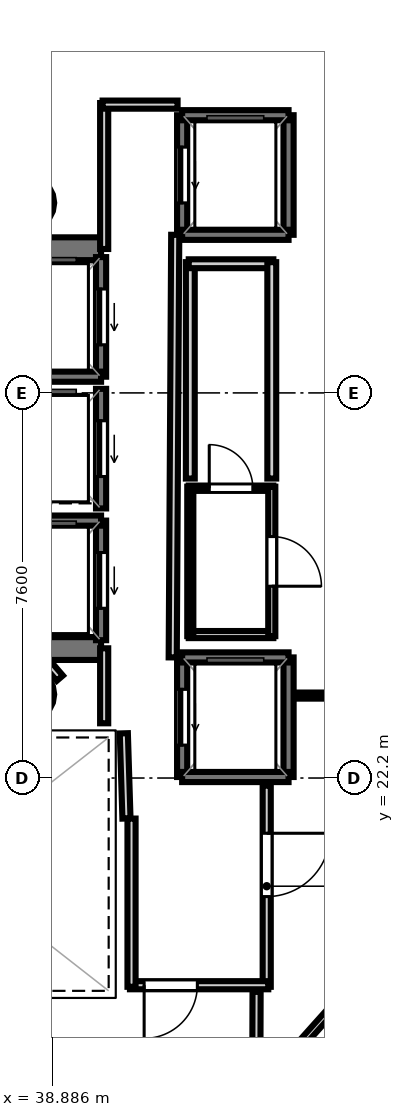
"""IFC4 building model, lengths in metres.
Left out: names, types, materials, properties, quantities, classifications, styles, units other than length and angle.
Written with IfcOpenShell. Run it as: python <this file> out.ifc"""

import sys

from ifc_helpers import new_model, si_unit, direction, frame, frame_2d, origin, origin_2d, place, context, subcontext, project, spatial, rectangle, hollow_circle, extrude, element, fill, save


model = new_model("IFC4")
c1 = context("Model", 3, precision=1e-05, world=origin(), true_north=direction((0.0, 1.0)))
c2 = subcontext(c1, "Body", "Model", "MODEL_VIEW")
j1 = project(units=[si_unit("LENGTHUNIT", "METRE"), si_unit("PLANEANGLEUNIT", "RADIAN")], contexts=[c1])
p1 = place(None, origin())
s1 = spatial("IfcSite", under=j1, at=p1, CompositionType="ELEMENT")
p2 = place(p1, origin())
s2 = spatial("IfcBuilding", under=s1, at=p2, CompositionType="ELEMENT")
p3 = place(p2, frame((0.0, 0.0, 250.1)))
s3 = spatial("IfcBuildingStorey", under=s2, at=p3, CompositionType="ELEMENT", Elevation=250.1)
p4 = place(p3, frame((29.33, 32.645, 0.0), z_axis=(0.0, 0.0, 1.0), x_axis=(1.0, 0.0, 0.0)))
e1 = element("IfcWall", 1, at=p4, inside=s3, PredefinedType="SHEAR", context=c2, shape_type="SweptSolid", body=[
    extrude(rectangle(XDim=10.52, YDim=0.45, at=frame_2d((5.26, 0.0))), origin(), (0.0, 0.0, 1.0), 3.52),
])
p5 = place(p4, frame((0.895, 0.0, 0.0)))
e2 = element("IfcOpeningElement", 2, at=p5, cuts=e1, PredefinedType="OPENING", context=c2, shape_type="SweptSolid", body=[
    extrude(rectangle(XDim=1.25, YDim=2.15, at=frame_2d((0.625, 1.075))), frame((0.0, 0.235, 0.0), z_axis=(0.0, -1.0, 0.0), x_axis=(1.0, 0.0, 0.0)), (0.0, 0.0, 1.0), 0.47),
])
p6 = place(p3, frame((29.33, 24.755, 0.0), z_axis=(0.0, 0.0, 1.0), x_axis=(1.0, 0.0, 0.0)))
e3 = element("IfcWall", 3, at=p6, inside=s3, PredefinedType="SHEAR", context=c2, shape_type="SweptSolid", body=[
    extrude(rectangle(XDim=10.52, YDim=0.45, at=frame_2d((5.26, 0.0))), origin(), (0.0, 0.0, 1.0), 3.52),
])
p7 = place(p6, frame((0.695, 0.0, 0.0)))
e4 = element("IfcOpeningElement", 4, at=p7, cuts=e3, PredefinedType="OPENING", context=c2, shape_type="SweptSolid", body=[
    extrude(rectangle(XDim=1.25, YDim=2.15, at=frame_2d((0.625, 1.075))), frame((0.0, 0.235, 0.0), z_axis=(0.0, -1.0, 0.0), x_axis=(1.0, 0.0, 0.0)), (0.0, 0.0, 1.0), 0.47),
])
for number, where, z_axis, x_axis in (
    (5, (38.4, 33.55, 0.0), (0.0, 0.0, 1.0), (1.0, 0.0, 0.0)),
    (6, (38.4, 23.85, 0.0), (0.0, 0.0, 1.0), (1.0, 0.0, 0.0)),
):
    element("IfcColumn", number, at=place(p3, frame(where, z_axis=z_axis, x_axis=x_axis)), inside=s3, PredefinedType="COLUMN", context=c2, shape_type="SweptSolid", body=[
        extrude(hollow_circle(Radius=0.525, WallThickness=0.028, at=origin_2d()), origin(), (0.0, 0.0, 1.0), 3.7),
    ])
p8 = place(p3, frame((39.85, 30.12, 0.0), z_axis=(0.0, 0.0, 1.0), x_axis=(0.0, 1.0, 0.0)))
e7 = element("IfcWall", 7, at=p8, inside=s3, PredefinedType="SOLIDWALL", context=c2, shape_type="SweptSolid", body=[
    extrude(rectangle(XDim=2.36, YDim=0.2, at=frame_2d((1.18, 0.0))), origin(), (0.0, 0.0, 1.0), 3.52),
])
p9 = place(p8, frame((0.63, 0.0, 0.0)))
e8 = element("IfcOpeningElement", 8, at=p9, cuts=e7, PredefinedType="OPENING", context=c2, shape_type="SweptSolid", body=[
    extrude(rectangle(XDim=1.1, YDim=2.15, at=frame_2d((0.55, 1.075))), frame((0.0, 0.11, 0.0), z_axis=(0.0, -1.0, 0.0), x_axis=(1.0, 0.0, 0.0)), (0.0, 0.0, 1.0), 0.22),
])
p10 = place(p3, frame((37.75, 30.12, 0.0), z_axis=(0.0, 0.0, 1.0), x_axis=(1.0, 0.0, 0.0)))
e9 = element("IfcWall", 9, at=p10, inside=s3, PredefinedType="SOLIDWALL", context=c2, shape_type="SweptSolid", body=[
    extrude(rectangle(XDim=2.1, YDim=0.2, at=frame_2d((1.05, 0.0))), origin(), (0.0, 0.0, 1.0), 3.52),
])
p11 = place(p3, frame((39.85, 24.92, 0.0), z_axis=(0.0, 0.0, 1.0), x_axis=(0.0, 1.0, 0.0)))
e10 = element("IfcWall", 10, at=p11, inside=s3, PredefinedType="SOLIDWALL", context=c2, shape_type="SweptSolid", body=[
    extrude(rectangle(XDim=2.36, YDim=0.2, at=frame_2d((1.18, 0.0))), origin(), (0.0, 0.0, 1.0), 3.52),
])
p12 = place(p11, frame((0.63, 0.0, 0.0)))
e11 = element("IfcOpeningElement", 11, at=p12, cuts=e10, PredefinedType="OPENING", context=c2, shape_type="SweptSolid", body=[
    extrude(rectangle(XDim=1.1, YDim=2.15, at=frame_2d((0.55, 1.075))), frame((0.0, 0.11, 0.0), z_axis=(0.0, -1.0, 0.0), x_axis=(1.0, 0.0, 0.0)), (0.0, 0.0, 1.0), 0.22),
])
p13 = place(p3, frame((37.75, 27.28, 0.0), z_axis=(0.0, 0.0, 1.0), x_axis=(1.0, 0.0, 0.0)))
e12 = element("IfcWall", 12, at=p13, inside=s3, PredefinedType="SOLIDWALL", context=c2, shape_type="SweptSolid", body=[
    extrude(rectangle(XDim=2.1, YDim=0.2, at=frame_2d((1.05, 0.0))), origin(), (0.0, 0.0, 1.0), 3.52),
])
p14 = place(p3, frame((39.85, 27.52, 0.0), z_axis=(0.0, 0.0, 1.0), x_axis=(0.0, 1.0, 0.0)))
e13 = element("IfcWall", 13, at=p14, inside=s3, PredefinedType="SOLIDWALL", context=c2, shape_type="SweptSolid", body=[
    extrude(rectangle(XDim=2.36, YDim=0.2, at=frame_2d((1.18, 0.0))), origin(), (0.0, 0.0, 1.0), 3.52),
])
p15 = place(p14, frame((0.63, 0.0, 0.0)))
e14 = element("IfcOpeningElement", 14, at=p15, cuts=e13, PredefinedType="OPENING", context=c2, shape_type="SweptSolid", body=[
    extrude(rectangle(XDim=1.1, YDim=2.15, at=frame_2d((0.55, 1.075))), frame((0.0, 0.11, 0.0), z_axis=(0.0, -1.0, 0.0), x_axis=(1.0, 0.0, 0.0)), (0.0, 0.0, 1.0), 0.22),
])
p16 = place(p3, frame((43.55, 22.22, 0.0), z_axis=(0.0, 0.0, 1.0), x_axis=(0.0, 1.0, 0.0)))
e15 = element("IfcWall", 15, at=p16, inside=s3, PredefinedType="SOLIDWALL", context=c2, shape_type="SweptSolid", body=[
    extrude(rectangle(XDim=2.36, YDim=0.2, at=frame_2d((1.18, 0.0))), origin(), (0.0, 0.0, 1.0), 3.52),
])
p17 = place(p3, frame((41.45, 22.22, 0.0), z_axis=(0.0, 0.0, 1.0), x_axis=(0.0, 1.0, 0.0)))
e16 = element("IfcWall", 16, at=p17, inside=s3, PredefinedType="SOLIDWALL", context=c2, shape_type="SweptSolid", body=[
    extrude(rectangle(XDim=2.36, YDim=0.2, at=frame_2d((1.18, 0.0))), origin(), (0.0, 0.0, 1.0), 3.52),
])
p18 = place(p17, frame((0.63, 0.0, 0.0)))
e17 = element("IfcOpeningElement", 17, at=p18, cuts=e16, PredefinedType="OPENING", context=c2, shape_type="SweptSolid", body=[
    extrude(rectangle(XDim=1.1, YDim=2.15, at=frame_2d((0.55, 1.075))), frame((0.0, 0.11, 0.0), z_axis=(0.0, -1.0, 0.0), x_axis=(1.0, 0.0, 0.0)), (0.0, 0.0, 1.0), 0.22),
])
for number, where, z_axis, x_axis in (
    (18, (41.45, 24.58, 0.0), (0.0, 0.0, 1.0), (1.0, 0.0, 0.0)),
    (19, (41.45, 22.22, 0.0), (0.0, 0.0, 1.0), (1.0, 0.0, 0.0)),
):
    element("IfcWall", number, at=place(p3, frame(where, z_axis=z_axis, x_axis=x_axis)), inside=s3, PredefinedType="SOLIDWALL", context=c2, shape_type="SweptSolid", body=[
        extrude(rectangle(XDim=2.1, YDim=0.2, at=frame_2d((1.05, 0.0))), origin(), (0.0, 0.0, 1.0), 3.52),
    ])
p19 = place(p3, frame((43.55, 32.92, 0.0), z_axis=(0.0, 0.0, 1.0), x_axis=(0.0, 1.0, 0.0)))
e20 = element("IfcWall", 20, at=p19, inside=s3, PredefinedType="SOLIDWALL", context=c2, shape_type="SweptSolid", body=[
    extrude(rectangle(XDim=2.36, YDim=0.2, at=frame_2d((1.18, 0.0))), origin(), (0.0, 0.0, 1.0), 3.52),
])
p20 = place(p3, frame((41.45, 32.92, 0.0), z_axis=(0.0, 0.0, 1.0), x_axis=(0.0, 1.0, 0.0)))
e21 = element("IfcWall", 21, at=p20, inside=s3, PredefinedType="SOLIDWALL", context=c2, shape_type="SweptSolid", body=[
    extrude(rectangle(XDim=2.36, YDim=0.2, at=frame_2d((1.18, 0.0))), origin(), (0.0, 0.0, 1.0), 3.52),
])
p21 = place(p20, frame((0.63, 0.0, 0.0)))
e22 = element("IfcOpeningElement", 22, at=p21, cuts=e21, PredefinedType="OPENING", context=c2, shape_type="SweptSolid", body=[
    extrude(rectangle(XDim=1.1, YDim=2.15, at=frame_2d((0.55, 1.075))), frame((0.0, 0.11, 0.0), z_axis=(0.0, -1.0, 0.0), x_axis=(1.0, 0.0, 0.0)), (0.0, 0.0, 1.0), 0.22),
])
for number, where, z_axis, x_axis in (
    (23, (41.45, 35.28, 0.0), (0.0, 0.0, 1.0), (1.0, 0.0, 0.0)),
    (24, (41.45, 32.92, 0.0), (0.0, 0.0, 1.0), (1.0, 0.0, 0.0)),
):
    element("IfcWall", number, at=place(p3, frame(where, z_axis=z_axis, x_axis=x_axis)), inside=s3, PredefinedType="SOLIDWALL", context=c2, shape_type="SweptSolid", body=[
        extrude(rectangle(XDim=2.1, YDim=0.2, at=frame_2d((1.05, 0.0))), origin(), (0.0, 0.0, 1.0), 3.52),
    ])
p22 = place(p3, frame((40.351, 21.401, 0.0), z_axis=(0.0, 0.0, 1.0), x_axis=(-0.031058045979, 0.999517582527, 0.0)))
e25 = element("IfcWall", 25, at=p22, inside=s3, PredefinedType="PARTITIONING", context=c2, shape_type="SweptSolid", body=[
    extrude(rectangle(XDim=1.682, YDim=0.16, at=frame_2d((0.841, 0.0))), origin(), (0.0, 0.0, 1.0), 2.84),
])
p23 = place(p3, frame((39.911, 23.28, 0.0), z_axis=(0.0, 0.0, 1.0), x_axis=(0.0, 1.0, 0.0)))
e26 = element("IfcWall", 26, at=p23, inside=s3, PredefinedType="PARTITIONING", context=c2, shape_type="SweptSolid", body=[
    extrude(rectangle(XDim=1.48, YDim=0.16, at=frame_2d((0.74, 0.0))), origin(), (0.0, 0.0, 1.0), 2.84),
])
p24 = place(p3, frame((39.911, 32.64, 0.0), z_axis=(0.0, 0.0, 1.0), x_axis=(0.0, 1.0, 0.0)))
e27 = element("IfcWall", 27, at=p24, inside=s3, PredefinedType="PARTITIONING", context=c2, shape_type="SweptSolid", body=[
    extrude(rectangle(XDim=2.88, YDim=0.16, at=frame_2d((1.44, 0.0))), origin(), (0.0, 0.0, 1.0), 2.84),
])
p25 = place(p3, frame((39.88, 35.489, 0.0), z_axis=(0.0, 0.0, 1.0), x_axis=(1.0, 0.0, 0.0)))
e28 = element("IfcWall", 28, at=p25, inside=s3, PredefinedType="PARTITIONING", context=c2, shape_type="SweptSolid", body=[
    extrude(rectangle(XDim=1.48, YDim=0.16, at=frame_2d((0.74, 0.0))), origin(), (0.0, 0.0, 1.0), 2.84),
])
p26 = place(p3, frame((41.313, 32.92, 0.0), z_axis=(0.0, 0.0, 1.0), x_axis=(-0.005942518022, -0.999982343084, 0.0)))
e29 = element("IfcWall", 29, at=p26, inside=s3, PredefinedType="PARTITIONING", context=c2, shape_type="SweptSolid", body=[
    extrude(rectangle(XDim=8.34, YDim=0.16, at=frame_2d((4.17, 0.0))), origin(), (0.0, 0.0, 1.0), 2.84),
])
p27 = place(p3, frame((43.119, 22.05, 0.0), z_axis=(0.0, 0.0, 1.0), x_axis=(0.0, -1.0, 0.0)))
e30 = element("IfcWall", 30, at=p27, inside=s3, PredefinedType="PARTITIONING", context=c2, shape_type="SweptSolid", body=[
    extrude(rectangle(XDim=3.97, YDim=0.16, at=frame_2d((1.985, 0.0))), origin(), (0.0, 0.0, 1.0), 2.84),
])
p28 = place(p27, frame((0.94, 0.0, 0.0)))
e31 = element("IfcOpeningElement", 31, at=p28, cuts=e30, PredefinedType="OPENING", context=c2, shape_type="SweptSolid", body=[
    extrude(rectangle(XDim=1.25, YDim=2.2, at=frame_2d((0.625, 1.1))), frame((0.0, 0.09, 0.0), z_axis=(0.0, -1.0, 0.0), x_axis=(1.0, 0.0, 0.0)), (0.0, 0.0, 1.0), 0.18),
])
p29 = place(p3, frame((43.15, 18.111, 0.0), z_axis=(0.0, 0.0, 1.0), x_axis=(-1.0, 0.0, 0.0)))
e32 = element("IfcWall", 32, at=p29, inside=s3, PredefinedType="PARTITIONING", context=c2, shape_type="SweptSolid", body=[
    extrude(rectangle(XDim=2.73, YDim=0.16, at=frame_2d((1.365, 0.0))), origin(), (0.0, 0.0, 1.0), 2.84),
])
p30 = place(p29, frame((1.4, 0.0, 0.0)))
e33 = element("IfcOpeningElement", 33, at=p30, cuts=e32, PredefinedType="OPENING", context=c2, shape_type="SweptSolid", body=[
    extrude(rectangle(XDim=1.05, YDim=2.15, at=frame_2d((0.525, 1.075))), frame((0.0, 0.09, 0.0), z_axis=(0.0, -1.0, 0.0), x_axis=(1.0, 0.0, 0.0)), (0.0, 0.0, 1.0), 0.18),
])
p31 = place(p3, frame((40.451, 18.08, 0.0), z_axis=(0.0, 0.0, 1.0), x_axis=(0.0, 1.0, 0.0)))
e34 = element("IfcWall", 34, at=p31, inside=s3, PredefinedType="PARTITIONING", context=c2, shape_type="SweptSolid", body=[
    extrude(rectangle(XDim=3.32, YDim=0.16, at=frame_2d((1.66, 0.0))), origin(), (0.0, 0.0, 1.0), 2.84),
])
p32 = place(p3, frame((43.25, 25.031, 0.0), z_axis=(0.0, 0.0, 1.0), x_axis=(-1.0, 0.0, 0.0)))
e35 = element("IfcWall", 35, at=p32, inside=s3, PredefinedType="PARTITIONING", context=c2, shape_type="SweptSolid", body=[
    extrude(rectangle(XDim=1.67, YDim=0.14, at=frame_2d((0.835, 0.0))), origin(), (0.0, 0.0, 1.0), 2.84),
])
p33 = place(p3, frame((41.611, 25.0, 0.0), z_axis=(0.0, 0.0, 1.0), x_axis=(0.0, 1.0, 0.0)))
e36 = element("IfcWall", 36, at=p33, inside=s3, PredefinedType="PARTITIONING", context=c2, shape_type="SweptSolid", body=[
    extrude(rectangle(XDim=2.95, YDim=0.12, at=frame_2d((1.475, 0.0))), origin(), (0.0, 0.0, 1.0), 2.84),
])
p34 = place(p3, frame((41.58, 27.919, 0.0), z_axis=(0.0, 0.0, 1.0), x_axis=(1.0, 0.0, 0.0)))
e37 = element("IfcWall", 37, at=p34, inside=s3, PredefinedType="PARTITIONING", context=c2, shape_type="SweptSolid", body=[
    extrude(rectangle(XDim=1.67, YDim=0.105, at=frame_2d((0.835, 0.0))), origin(), (0.0, 0.0, 1.0), 2.84),
])
p35 = place(p34, frame((0.405, 0.0, 0.0)))
e38 = element("IfcOpeningElement", 38, at=p35, cuts=e37, PredefinedType="OPENING", context=c2, shape_type="SweptSolid", body=[
    extrude(rectangle(XDim=0.86, YDim=2.05, at=frame_2d((0.43, 1.025))), frame((0.0, 0.062, 0.0), z_axis=(0.0, -1.0, 0.0), x_axis=(1.0, 0.0, 0.0)), (0.0, 0.0, 1.0), 0.125),
])
p36 = place(p3, frame((43.219, 27.95, 0.0), z_axis=(0.0, 0.0, 1.0), x_axis=(0.0, -1.0, 0.0)))
e39 = element("IfcWall", 39, at=p36, inside=s3, PredefinedType="PARTITIONING", context=c2, shape_type="SweptSolid", body=[
    extrude(rectangle(XDim=2.95, YDim=0.14, at=frame_2d((1.475, 0.0))), origin(), (0.0, 0.0, 1.0), 2.84),
])
p37 = place(p36, frame((0.985, 0.0, 0.0)))
e40 = element("IfcOpeningElement", 40, at=p37, cuts=e39, PredefinedType="OPENING", context=c2, shape_type="SweptSolid", body=[
    extrude(rectangle(XDim=0.98, YDim=2.1, at=frame_2d((0.49, 1.05))), frame((0.0, 0.08, 0.0), z_axis=(0.0, -1.0, 0.0), x_axis=(1.0, 0.0, 0.0)), (0.0, 0.0, 1.0), 0.16),
])
p38 = place(p3, frame((41.611, 28.11, 0.0), z_axis=(0.0, 0.0, 1.0), x_axis=(0.0, 1.0, 0.0)))
e41 = element("IfcWall", 41, at=p38, inside=s3, PredefinedType="PLUMBINGWALL", context=c2, shape_type="SweptSolid", body=[
    extrude(rectangle(XDim=4.27, YDim=0.175, at=frame_2d((2.135, 0.0))), origin(), (0.0, 0.0, 1.0), 2.84),
])
p39 = place(p3, frame((41.58, 32.349, 0.0), z_axis=(0.0, 0.0, 1.0), x_axis=(1.0, 0.0, 0.0)))
e42 = element("IfcWall", 42, at=p39, inside=s3, PredefinedType="PLUMBINGWALL", context=c2, shape_type="SweptSolid", body=[
    extrude(rectangle(XDim=1.67, YDim=0.175, at=frame_2d((0.835, 0.0))), origin(), (0.0, 0.0, 1.0), 2.84),
])
p40 = place(p3, frame((43.219, 32.38, 0.0), z_axis=(0.0, 0.0, 1.0), x_axis=(0.0, -1.0, 0.0)))
e43 = element("IfcWall", 43, at=p40, inside=s3, PredefinedType="PLUMBINGWALL", context=c2, shape_type="SweptSolid", body=[
    extrude(rectangle(XDim=4.27, YDim=0.175, at=frame_2d((2.135, 0.0))), origin(), (0.0, 0.0, 1.0), 2.84),
])
p41 = place(p3, frame((39.036, 24.17, 0.0), z_axis=(0.0, 0.0, 1.0), x_axis=(-0.652260263346, 0.757995084984, 0.0)))
e44 = element("IfcWall", 44, at=p41, inside=s3, PredefinedType="PARTITIONING", context=c2, shape_type="SweptSolid", body=[
    extrude(rectangle(XDim=0.355, YDim=0.16, at=frame_2d((0.178, 0.0))), origin(), (0.0, 0.0, 1.0), 2.84),
])
p42 = place(p3, frame((42.919, 17.98, 0.0), z_axis=(0.0, 0.0, 1.0), x_axis=(-0.003320260942, -0.999994487918, 0.0)))
e45 = element("IfcWall", 45, at=p42, inside=s3, PredefinedType="PARTITIONING", context=c2, shape_type="SweptSolid", body=[
    extrude(rectangle(XDim=2.868, YDim=0.16, at=frame_2d((1.434, 0.0))), origin(), (0.0, 0.0, 1.0), 2.84),
])
p43 = place(p3, frame((43.72, 23.827, 0.0), z_axis=(0.0, 0.0, 1.0), x_axis=(1.0, 0.0, 0.0)))
e46 = element("IfcWall", 46, at=p43, inside=s3, PredefinedType="PARTITIONING", context=c2, shape_type="SweptSolid", body=[
    extrude(rectangle(XDim=6.985, YDim=0.12, at=frame_2d((3.493, 0.0))), origin(), (0.0, 0.0, 1.0), 2.84),
])
p44 = place(p43, frame((2.868, 0.0, 0.0)))
e47 = element("IfcOpeningElement", 47, at=p44, cuts=e46, PredefinedType="OPENING", context=c2, shape_type="SweptSolid", body=[
    extrude(rectangle(XDim=1.25, YDim=2.2, at=frame_2d((0.625, 1.1))), frame((0.0, 0.07, 0.0), z_axis=(0.0, -1.0, 0.0), x_axis=(1.0, 0.0, 0.0)), (0.0, 0.0, 1.0), 0.14),
])
p45 = place(p3, frame((47.06, 20.6, 0.0), z_axis=(0.0, 0.0, 1.0), x_axis=(-0.666617878576, -0.745399627021, 0.0)))
e48 = element("IfcWall", 48, at=p45, inside=s3, PredefinedType="PARTITIONING", context=c2, shape_type="SweptSolid", body=[
    extrude(rectangle(XDim=6.089, YDim=0.14, at=frame_2d((3.045, 0.0))), origin(), (0.0, 0.0, 1.0), 2.84),
])
p46 = place(p3, frame((22.064, 36.865, 0.0), z_axis=(0.0, 0.0, 1.0), x_axis=(0.999959914734, -0.008953710146, 0.0)))
e49 = element("IfcWall", 49, at=p46, inside=s3, PredefinedType="PARTITIONING", context=c2, shape_type="SweptSolid", body=[
    extrude(rectangle(XDim=34.711, YDim=0.12, at=frame_2d((17.355, 0.0))), origin(), (0.0, 0.0, 1.0), 2.84),
])
p47 = place(p9, origin())
e50 = element("IfcDoor", 50, at=p47, inside=s3, OperationType="SLIDING_TO_LEFT", PredefinedType="DOOR", context=c2, shape_type="SweptSolid", body=[
    extrude(rectangle(XDim=1.1, YDim=2.15, at=frame_2d((0.55, 1.075))), frame((0.0, 0.025, 0.0), z_axis=(0.0, -1.0, 0.0), x_axis=(1.0, 0.0, 0.0)), (0.0, 0.0, 1.0), 0.05),
])
fill(e8, e50)
p48 = place(p12, origin())
e51 = element("IfcDoor", 51, at=p48, inside=s3, OperationType="SLIDING_TO_LEFT", PredefinedType="DOOR", context=c2, shape_type="SweptSolid", body=[
    extrude(rectangle(XDim=1.1, YDim=2.15, at=frame_2d((0.55, 1.075))), frame((0.0, 0.025, 0.0), z_axis=(0.0, -1.0, 0.0), x_axis=(1.0, 0.0, 0.0)), (0.0, 0.0, 1.0), 0.05),
])
fill(e11, e51)
p49 = place(p15, origin())
e52 = element("IfcDoor", 52, at=p49, inside=s3, OperationType="SLIDING_TO_LEFT", PredefinedType="DOOR", context=c2, shape_type="SweptSolid", body=[
    extrude(rectangle(XDim=1.1, YDim=2.15, at=frame_2d((0.55, 1.075))), frame((0.0, 0.025, 0.0), z_axis=(0.0, -1.0, 0.0), x_axis=(1.0, 0.0, 0.0)), (0.0, 0.0, 1.0), 0.05),
])
fill(e14, e52)
p50 = place(p18, origin())
e53 = element("IfcDoor", 53, at=p50, inside=s3, OperationType="SLIDING_TO_LEFT", PredefinedType="DOOR", context=c2, shape_type="SweptSolid", body=[
    extrude(rectangle(XDim=1.1, YDim=2.15, at=frame_2d((0.55, 1.075))), frame((0.0, 0.025, 0.0), z_axis=(0.0, -1.0, 0.0), x_axis=(1.0, 0.0, 0.0)), (0.0, 0.0, 1.0), 0.05),
])
fill(e17, e53)
p51 = place(p21, origin())
e54 = element("IfcDoor", 54, at=p51, inside=s3, OperationType="SLIDING_TO_LEFT", PredefinedType="DOOR", context=c2, shape_type="SweptSolid", body=[
    extrude(rectangle(XDim=1.1, YDim=2.15, at=frame_2d((0.55, 1.075))), frame((0.0, 0.025, 0.0), z_axis=(0.0, -1.0, 0.0), x_axis=(1.0, 0.0, 0.0)), (0.0, 0.0, 1.0), 0.05),
])
fill(e22, e54)
p52 = place(p30, origin())
e55 = element("IfcDoor", 55, at=p52, inside=s3, OperationType="SINGLE_SWING_RIGHT", PredefinedType="DOOR", context=c2, shape_type="SweptSolid", body=[
    extrude(rectangle(XDim=1.05, YDim=2.15, at=frame_2d((0.525, 1.075))), frame((0.0, 0.025, 0.0), z_axis=(0.0, -1.0, 0.0), x_axis=(1.0, 0.0, 0.0)), (0.0, 0.0, 1.0), 0.05),
])
fill(e33, e55)
p53 = place(p28, origin())
e56 = element("IfcDoor", 56, at=p53, inside=s3, OperationType="SINGLE_SWING_LEFT", PredefinedType="DOOR", context=c2, shape_type="SweptSolid", body=[
    extrude(rectangle(XDim=1.25, YDim=2.2, at=frame_2d((0.625, 1.1))), frame((0.0, 0.025, 0.0), z_axis=(0.0, -1.0, 0.0), x_axis=(1.0, 0.0, 0.0)), (0.0, 0.0, 1.0), 0.05),
])
fill(e31, e56)
p54 = place(p37, origin())
e57 = element("IfcDoor", 57, at=p54, inside=s3, OperationType="SINGLE_SWING_RIGHT", PredefinedType="DOOR", context=c2, shape_type="SweptSolid", body=[
    extrude(rectangle(XDim=0.98, YDim=2.1, at=frame_2d((0.49, 1.05))), frame((0.0, 0.025, 0.0), z_axis=(0.0, -1.0, 0.0), x_axis=(1.0, 0.0, 0.0)), (0.0, 0.0, 1.0), 0.05),
])
fill(e40, e57)
p55 = place(p35, origin())
e58 = element("IfcDoor", 58, at=p55, inside=s3, OperationType="SINGLE_SWING_LEFT", PredefinedType="DOOR", context=c2, shape_type="SweptSolid", body=[
    extrude(rectangle(XDim=0.86, YDim=2.05, at=frame_2d((0.43, 1.025))), frame((0.0, 0.025, 0.0), z_axis=(0.0, -1.0, 0.0), x_axis=(1.0, 0.0, 0.0)), (0.0, 0.0, 1.0), 0.05),
])
fill(e38, e58)
save(model, sys.argv[1])
